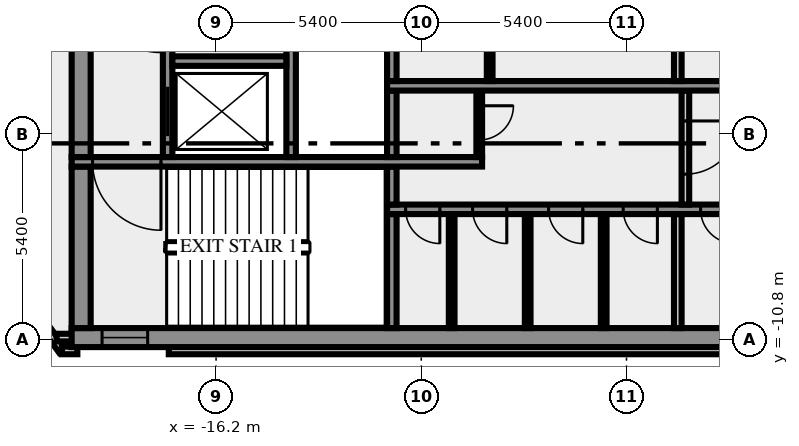
"""IFC4 building model, lengths in metres.
Left out: names, types, materials, properties, quantities, classifications, styles, units other than length and angle.
Written with IfcOpenShell. Run it as: python <this file> out.ifc"""

import sys

from ifc_helpers import new_model, si_unit, direction, frame, frame_2d, origin, place, context, subcontext, project, spatial, rectangle, extrude, element, fill, save


model = new_model("IFC4")
c1 = context("Model", 3, precision=1e-05, world=origin(), true_north=direction((0.0, 1.0)))
c2 = subcontext(c1, "Body", "Model", "MODEL_VIEW")
j1 = project(units=[si_unit("LENGTHUNIT", "METRE"), si_unit("PLANEANGLEUNIT", "RADIAN")], contexts=[c1])
p1 = place(None, origin())
s1 = spatial("IfcSite", under=j1, at=p1, CompositionType="ELEMENT")
p2 = place(p1, origin())
s2 = spatial("IfcBuilding", under=s1, at=p2, CompositionType="ELEMENT")
p3 = place(p2, frame((0.0, 0.0, 198.0)))
s3 = spatial("IfcBuildingStorey", under=s2, at=p3, CompositionType="ELEMENT", Elevation=198.0)
p4 = place(p3, frame((-21.833, -8.909, 0.0), z_axis=(0.0, 0.0, 1.0), x_axis=(0.587766567315, -0.809030569476, 0.0)))
e1 = element("IfcWall", 1, at=p4, inside=s3, PredefinedType="SOLIDWALL", context=c2, shape_type="SweptSolid", body=[
    extrude(rectangle(XDim=2.688, YDim=0.2, at=frame_2d((1.344, 0.0))), origin(), (0.0, 0.0, 1.0), 3.65),
])
p5 = place(p3, frame((-20.256, -11.088, 0.0), z_axis=(0.0, 0.0, 1.0), x_axis=(1.0, 0.0, 0.0)))
e2 = element("IfcWall", 2, at=p5, inside=s3, PredefinedType="SOLIDWALL", context=c2, shape_type="SweptSolid", body=[
    extrude(rectangle(XDim=0.406, YDim=0.2, at=frame_2d((0.203, 0.0))), origin(), (0.0, 0.0, 1.0), 3.65),
])
p6 = place(p3, frame((-17.444, -11.088, 0.0), z_axis=(0.0, 0.0, 1.0), x_axis=(1.0, 0.0, 0.0)))
e3 = element("IfcWall", 3, at=p6, inside=s3, PredefinedType="SOLIDWALL", context=c2, shape_type="SweptSolid", body=[
    extrude(rectangle(XDim=34.888, YDim=0.2, at=frame_2d((17.444, 0.0))), origin(), (0.0, 0.0, 1.0), 3.65),
])
p7 = place(p3, frame((-19.98, -10.75, 0.0), z_axis=(0.0, 0.0, 1.0), x_axis=(-1.0, 0.0, 0.0)))
e4 = element("IfcWall", 4, at=p7, inside=s3, PredefinedType="SOLIDWALL", context=c2, shape_type="SweptSolid", body=[
    extrude(rectangle(XDim=0.417, YDim=0.2, at=frame_2d((0.208, 0.0))), origin(), (0.0, 0.0, 1.0), 3.65),
])
p8 = place(p3, frame((-20.0, -10.75, 0.0), z_axis=(0.0, 0.0, 1.0), x_axis=(1.0, 0.0, 0.0)))
e5 = element("IfcWall", 5, at=p8, inside=s3, PredefinedType="SHEAR", context=c2, shape_type="SweptSolid", body=[
    extrude(rectangle(XDim=40.0, YDim=0.5, at=frame_2d((20.0, 0.0))), origin(), (0.0, 0.0, 1.0), 3.65),
])
p9 = place(p8, frame((0.8, 0.0, 1.0)))
e6 = element("IfcOpeningElement", 6, at=p9, cuts=e5, PredefinedType="OPENING", context=c2, shape_type="SweptSolid", body=[
    extrude(rectangle(XDim=1.2, YDim=1.2, at=frame_2d((0.6, 0.6))), frame((0.0, 0.26, 0.0), z_axis=(0.0, -1.0, 0.0), x_axis=(1.0, 0.0, 0.0)), (0.0, 0.0, 1.0), 0.52),
])
p10 = place(p8, frame((38.0, 0.0, 1.0)))
e7 = element("IfcOpeningElement", 7, at=p10, cuts=e5, PredefinedType="OPENING", context=c2, shape_type="SweptSolid", body=[
    extrude(rectangle(XDim=1.2, YDim=1.2, at=frame_2d((0.6, 0.6))), frame((0.0, 0.26, 0.0), z_axis=(0.0, -1.0, 0.0), x_axis=(1.0, 0.0, 0.0)), (0.0, 0.0, 1.0), 0.52),
])
p11 = place(p3, frame((-19.75, -10.5, 0.0), z_axis=(0.0, 0.0, 1.0), x_axis=(0.0, 1.0, 0.0)))
e8 = element("IfcWall", 8, at=p11, inside=s3, PredefinedType="SHEAR", context=c2, shape_type="SweptSolid", body=[
    extrude(rectangle(XDim=4.25, YDim=0.5, at=frame_2d((2.125, 0.0))), origin(), (0.0, 0.0, 1.0), 3.65),
])
p12 = place(p3, frame((-11.575, -10.5, 0.0), z_axis=(0.0, 0.0, 1.0), x_axis=(0.0, 1.0, 0.0)))
e9 = element("IfcWall", 9, at=p12, inside=s3, PredefinedType="SHEAR", context=c2, shape_type="SweptSolid", body=[
    extrude(rectangle(XDim=3.0, YDim=0.25, at=frame_2d((1.5, 0.0))), origin(), (0.0, 0.0, 1.0), 3.65),
])
for number, where, z_axis, x_axis in (
    (10, (-10.0, -10.5, 0.0), (0.0, 0.0, 1.0), (0.0, 1.0, 0.0)),
    (11, (-8.0, -10.5, 0.0), (0.0, 0.0, 1.0), (0.0, 1.0, 0.0)),
    (12, (-6.0, -10.5, 0.0), (0.0, 0.0, 1.0), (0.0, 1.0, 0.0)),
):
    element("IfcWall", number, at=place(p3, frame(where, z_axis=z_axis, x_axis=x_axis)), inside=s3, PredefinedType="PARTITIONING", context=c2, shape_type="SweptSolid", body=[
        extrude(rectangle(XDim=3.0, YDim=0.15, at=frame_2d((1.5, 0.0))), origin(), (0.0, 0.0, 1.0), 3.65),
    ])
p13 = place(p3, frame((-4.05, -10.5, 0.0), z_axis=(0.0, 0.0, 1.0), x_axis=(0.0, 1.0, 0.0)))
e13 = element("IfcWall", 13, at=p13, inside=s3, PredefinedType="SOLIDWALL", context=c2, shape_type="SweptSolid", body=[
    extrude(rectangle(XDim=3.0, YDim=0.2, at=frame_2d((1.5, 0.0))), origin(), (0.0, 0.0, 1.0), 3.65),
])
p14 = place(p3, frame((11.7, -7.375, 0.0), z_axis=(0.0, 0.0, 1.0), x_axis=(-1.0, 0.0, 0.0)))
e14 = element("IfcWall", 14, at=p14, inside=s3, PredefinedType="SHEAR", context=c2, shape_type="SweptSolid", body=[
    extrude(rectangle(XDim=23.4, YDim=0.25, at=frame_2d((11.7, 0.0))), origin(), (0.0, 0.0, 1.0), 3.65),
])
p15 = place(p14, frame((22.012, 0.0, 0.0)))
e15 = element("IfcOpeningElement", 15, at=p15, cuts=e14, PredefinedType="OPENING", context=c2, shape_type="SweptSolid", body=[
    extrude(rectangle(XDim=0.9, YDim=2.1, at=frame_2d((0.45, 1.05))), frame((0.0, 0.135, 0.0), z_axis=(0.0, -1.0, 0.0), x_axis=(1.0, 0.0, 0.0)), (0.0, 0.0, 1.0), 0.27),
])
p16 = place(p14, frame((20.25, 0.0, 0.0)))
e16 = element("IfcOpeningElement", 16, at=p16, cuts=e14, PredefinedType="OPENING", context=c2, shape_type="SweptSolid", body=[
    extrude(rectangle(XDim=0.9, YDim=2.1, at=frame_2d((0.45, 1.05))), frame((0.0, 0.135, 0.0), z_axis=(0.0, -1.0, 0.0), x_axis=(1.0, 0.0, 0.0)), (0.0, 0.0, 1.0), 0.27),
])
p17 = place(p14, frame((18.25, 0.0, 0.0)))
e17 = element("IfcOpeningElement", 17, at=p17, cuts=e14, PredefinedType="OPENING", context=c2, shape_type="SweptSolid", body=[
    extrude(rectangle(XDim=0.9, YDim=2.1, at=frame_2d((0.45, 1.05))), frame((0.0, 0.135, 0.0), z_axis=(0.0, -1.0, 0.0), x_axis=(1.0, 0.0, 0.0)), (0.0, 0.0, 1.0), 0.27),
])
p18 = place(p14, frame((16.287, 0.0, 0.0)))
e18 = element("IfcOpeningElement", 18, at=p18, cuts=e14, PredefinedType="OPENING", context=c2, shape_type="SweptSolid", body=[
    extrude(rectangle(XDim=0.9, YDim=2.1, at=frame_2d((0.45, 1.05))), frame((0.0, 0.135, 0.0), z_axis=(0.0, -1.0, 0.0), x_axis=(1.0, 0.0, 0.0)), (0.0, 0.0, 1.0), 0.27),
])
p19 = place(p14, frame((14.25, 0.0, 0.0)))
e19 = element("IfcOpeningElement", 19, at=p19, cuts=e14, PredefinedType="OPENING", context=c2, shape_type="SweptSolid", body=[
    extrude(rectangle(XDim=0.9, YDim=2.1, at=frame_2d((0.45, 1.05))), frame((0.0, 0.135, 0.0), z_axis=(0.0, -1.0, 0.0), x_axis=(1.0, 0.0, 0.0)), (0.0, 0.0, 1.0), 0.27),
])
p20 = place(p14, frame((12.125, 0.0, 0.0)))
e20 = element("IfcOpeningElement", 20, at=p20, cuts=e14, PredefinedType="OPENING", context=c2, shape_type="SweptSolid", body=[
    extrude(rectangle(XDim=0.9, YDim=2.1, at=frame_2d((0.45, 1.05))), frame((0.0, 0.135, 0.0), z_axis=(0.0, -1.0, 0.0), x_axis=(1.0, 0.0, 0.0)), (0.0, 0.0, 1.0), 0.27),
])
p21 = place(p14, frame((10.45, 0.0, 0.0)))
e21 = element("IfcOpeningElement", 21, at=p21, cuts=e14, PredefinedType="OPENING", context=c2, shape_type="SweptSolid", body=[
    extrude(rectangle(XDim=0.75, YDim=2.1, at=frame_2d((0.375, 1.05))), frame((0.0, 0.135, 0.0), z_axis=(0.0, -1.0, 0.0), x_axis=(1.0, 0.0, 0.0)), (0.0, 0.0, 1.0), 0.27),
])
p22 = place(p14, frame((8.35, 0.0, 0.0)))
e22 = element("IfcOpeningElement", 22, at=p22, cuts=e14, PredefinedType="OPENING", context=c2, shape_type="SweptSolid", body=[
    extrude(rectangle(XDim=1.1, YDim=2.1, at=frame_2d((0.55, 1.05))), frame((0.0, 0.135, 0.0), z_axis=(0.0, -1.0, 0.0), x_axis=(1.0, 0.0, 0.0)), (0.0, 0.0, 1.0), 0.27),
])
p23 = place(p14, frame((5.85, 0.0, 0.0)))
e23 = element("IfcOpeningElement", 23, at=p23, cuts=e14, PredefinedType="OPENING", context=c2, shape_type="SweptSolid", body=[
    extrude(rectangle(XDim=1.1, YDim=2.1, at=frame_2d((0.55, 1.05))), frame((0.0, 0.135, 0.0), z_axis=(0.0, -1.0, 0.0), x_axis=(1.0, 0.0, 0.0)), (0.0, 0.0, 1.0), 0.27),
])
p24 = place(p14, frame((3.35, 0.0, 0.0)))
e24 = element("IfcOpeningElement", 24, at=p24, cuts=e14, PredefinedType="OPENING", context=c2, shape_type="SweptSolid", body=[
    extrude(rectangle(XDim=1.1, YDim=2.1, at=frame_2d((0.55, 1.05))), frame((0.0, 0.135, 0.0), z_axis=(0.0, -1.0, 0.0), x_axis=(1.0, 0.0, 0.0)), (0.0, 0.0, 1.0), 0.27),
])
p25 = place(p14, frame((0.85, 0.0, 0.0)))
e25 = element("IfcOpeningElement", 25, at=p25, cuts=e14, PredefinedType="OPENING", context=c2, shape_type="SweptSolid", body=[
    extrude(rectangle(XDim=1.1, YDim=2.1, at=frame_2d((0.55, 1.05))), frame((0.0, 0.135, 0.0), z_axis=(0.0, -1.0, 0.0), x_axis=(1.0, 0.0, 0.0)), (0.0, 0.0, 1.0), 0.27),
])
p26 = place(p3, frame((-11.575, -7.25, 0.0), z_axis=(0.0, 0.0, 1.0), x_axis=(0.0, 1.0, 0.0)))
e26 = element("IfcWall", 26, at=p26, inside=s3, PredefinedType="SHEAR", context=c2, shape_type="SweptSolid", body=[
    extrude(rectangle(XDim=1.0, YDim=0.25, at=frame_2d((0.5, 0.0))), origin(), (0.0, 0.0, 1.0), 3.65),
])
p27 = place(p3, frame((-3.85, -4.25, 0.0), z_axis=(0.0, 0.0, 1.0), x_axis=(0.0, -1.0, 0.0)))
e27 = element("IfcWall", 27, at=p27, inside=s3, PredefinedType="SOLIDWALL", context=c2, shape_type="SweptSolid", body=[
    extrude(rectangle(XDim=3.0, YDim=0.2, at=frame_2d((1.5, 0.0))), origin(), (0.0, 0.0, 1.0), 3.65),
])
p28 = place(p27, frame((0.8, 0.0, 0.0)))
e28 = element("IfcOpeningElement", 28, at=p28, cuts=e27, PredefinedType="OPENING", context=c2, shape_type="SweptSolid", body=[
    extrude(rectangle(XDim=1.4, YDim=2.1, at=frame_2d((0.7, 1.05))), frame((0.0, 0.11, 0.0), z_axis=(0.0, -1.0, 0.0), x_axis=(1.0, 0.0, 0.0)), (0.0, 0.0, 1.0), 0.22),
])
p29 = place(p3, frame((-9.2, -6.125, 0.0), z_axis=(0.0, 0.0, 1.0), x_axis=(-1.0, 0.0, 0.0)))
e29 = element("IfcWall", 29, at=p29, inside=s3, PredefinedType="SHEAR", context=c2, shape_type="SweptSolid", body=[
    extrude(rectangle(XDim=10.8, YDim=0.25, at=frame_2d((5.4, 0.0))), origin(), (0.0, 0.0, 1.0), 3.65),
])
p30 = place(p29, frame((8.45, 0.0, 0.0)))
e30 = element("IfcOpeningElement", 30, at=p30, cuts=e29, PredefinedType="OPENING", context=c2, shape_type="SweptSolid", body=[
    extrude(rectangle(XDim=1.8, YDim=2.1, at=frame_2d((0.9, 1.05))), frame((0.0, 0.135, 0.0), z_axis=(0.0, -1.0, 0.0), x_axis=(1.0, 0.0, 0.0)), (0.0, 0.0, 1.0), 0.27),
])
p31 = place(p3, frame((-19.75, -6.0, 0.0), z_axis=(0.0, 0.0, 1.0), x_axis=(0.0, 1.0, 0.0)))
e31 = element("IfcWall", 31, at=p31, inside=s3, PredefinedType="SHEAR", context=c2, shape_type="SweptSolid", body=[
    extrude(rectangle(XDim=4.3, YDim=0.5, at=frame_2d((2.15, 0.0))), origin(), (0.0, 0.0, 1.0), 3.65),
])
p32 = place(p3, frame((-17.475, -6.0, 0.0), z_axis=(0.0, 0.0, 1.0), x_axis=(0.0, 1.0, 0.0)))
e32 = element("IfcWall", 32, at=p32, inside=s3, PredefinedType="SHEAR", context=c2, shape_type="SweptSolid", body=[
    extrude(rectangle(XDim=4.3, YDim=0.25, at=frame_2d((2.15, 0.0))), origin(), (0.0, 0.0, 1.0), 3.65),
])
p33 = place(p32, frame((0.55, 0.0, 0.0)))
e33 = element("IfcOpeningElement", 33, at=p33, cuts=e32, PredefinedType="OPENING", context=c2, shape_type="SweptSolid", body=[
    extrude(rectangle(XDim=1.3, YDim=2.1, at=frame_2d((0.65, 1.05))), frame((0.0, 0.135, 0.0), z_axis=(0.0, -1.0, 0.0), x_axis=(1.0, 0.0, 0.0)), (0.0, 0.0, 1.0), 0.27),
])
p34 = place(p3, frame((-14.225, -6.0, 0.0), z_axis=(0.0, 0.0, 1.0), x_axis=(0.0, 1.0, 0.0)))
e34 = element("IfcWall", 34, at=p34, inside=s3, PredefinedType="SHEAR", context=c2, shape_type="SweptSolid", body=[
    extrude(rectangle(XDim=4.3, YDim=0.25, at=frame_2d((2.15, 0.0))), origin(), (0.0, 0.0, 1.0), 3.65),
])
p35 = place(p3, frame((-11.575, -6.0, 0.0), z_axis=(0.0, 0.0, 1.0), x_axis=(0.0, 1.0, 0.0)))
e35 = element("IfcWall", 35, at=p35, inside=s3, PredefinedType="SHEAR", context=c2, shape_type="SweptSolid", body=[
    extrude(rectangle(XDim=1.75, YDim=0.25, at=frame_2d((0.875, 0.0))), origin(), (0.0, 0.0, 1.0), 3.65),
])
p36 = place(p3, frame((-9.275, -4.25, 0.0), z_axis=(0.0, 0.0, 1.0), x_axis=(0.0, -1.0, 0.0)))
e36 = element("IfcWall", 36, at=p36, inside=s3, PredefinedType="PARTITIONING", context=c2, shape_type="SweptSolid", body=[
    extrude(rectangle(XDim=1.75, YDim=0.15, at=frame_2d((0.875, 0.0))), origin(), (0.0, 0.0, 1.0), 3.65),
])
p37 = place(p36, frame((0.4, 0.0, 0.0)))
e37 = element("IfcOpeningElement", 37, at=p37, cuts=e36, PredefinedType="OPENING", context=c2, shape_type="SweptSolid", body=[
    extrude(rectangle(XDim=0.9, YDim=2.1, at=frame_2d((0.45, 1.05))), frame((0.0, 0.085, 0.0), z_axis=(0.0, -1.0, 0.0), x_axis=(1.0, 0.0, 0.0)), (0.0, 0.0, 1.0), 0.17),
])
p38 = place(p3, frame((-11.7, -4.125, 0.0), z_axis=(0.0, 0.0, 1.0), x_axis=(1.0, 0.0, 0.0)))
e38 = element("IfcWall", 38, at=p38, inside=s3, PredefinedType="SHEAR", context=c2, shape_type="SweptSolid", body=[
    extrude(rectangle(XDim=10.05, YDim=0.25, at=frame_2d((5.025, 0.0))), origin(), (0.0, 0.0, 1.0), 3.65),
])
p39 = place(p3, frame((-11.575, -4.0, 0.0), z_axis=(0.0, 0.0, 1.0), x_axis=(0.0, 1.0, 0.0)))
e39 = element("IfcWall", 39, at=p39, inside=s3, PredefinedType="SHEAR", context=c2, shape_type="SweptSolid", body=[
    extrude(rectangle(XDim=2.3, YDim=0.25, at=frame_2d((1.15, 0.0))), origin(), (0.0, 0.0, 1.0), 3.65),
])
p40 = place(p3, frame((-9.0, -4.0, 0.0), z_axis=(0.0, 0.0, 1.0), x_axis=(0.0, 1.0, 0.0)))
e40 = element("IfcWall", 40, at=p40, inside=s3, PredefinedType="PARTITIONING", context=c2, shape_type="SweptSolid", body=[
    extrude(rectangle(XDim=2.3, YDim=0.15, at=frame_2d((1.15, 0.0))), origin(), (0.0, 0.0, 1.0), 3.65),
])
p41 = place(p3, frame((-4.05, -4.0, 0.0), z_axis=(0.0, 0.0, 1.0), x_axis=(0.0, 1.0, 0.0)))
e41 = element("IfcWall", 41, at=p41, inside=s3, PredefinedType="SOLIDWALL", context=c2, shape_type="SweptSolid", body=[
    extrude(rectangle(XDim=2.3, YDim=0.2, at=frame_2d((1.15, 0.0))), origin(), (0.0, 0.0, 1.0), 3.65),
])
p42 = place(p3, frame((-17.35, -3.475, 0.0), z_axis=(0.0, 0.0, 1.0), x_axis=(1.0, 0.0, 0.0)))
e42 = element("IfcWall", 42, at=p42, inside=s3, PredefinedType="SHEAR", context=c2, shape_type="SweptSolid", body=[
    extrude(rectangle(XDim=3.0, YDim=0.25, at=frame_2d((1.5, 0.0))), origin(), (0.0, 0.0, 1.0), 3.65),
])
p43 = place(p9, origin())
e43 = element("IfcWindow", 43, at=p43, inside=s3, PartitioningType="SINGLE_PANEL", PredefinedType="WINDOW", context=c2, shape_type="SweptSolid", body=[
    extrude(rectangle(XDim=1.2, YDim=1.2, at=frame_2d((0.6, 0.6))), frame((0.0, 0.03, 0.0), z_axis=(0.0, -1.0, 0.0), x_axis=(1.0, 0.0, 0.0)), (0.0, 0.0, 1.0), 0.06),
])
fill(e6, e43)
p44 = place(p15, origin())
e44 = element("IfcDoor", 44, at=p44, inside=s3, OperationType="SINGLE_SWING_RIGHT", PredefinedType="DOOR", context=c2, shape_type="SweptSolid", body=[
    extrude(rectangle(XDim=0.9, YDim=2.1, at=frame_2d((0.45, 1.05))), frame((0.0, 0.025, 0.0), z_axis=(0.0, -1.0, 0.0), x_axis=(1.0, 0.0, 0.0)), (0.0, 0.0, 1.0), 0.05),
])
fill(e15, e44)
p45 = place(p16, origin())
e45 = element("IfcDoor", 45, at=p45, inside=s3, OperationType="SINGLE_SWING_RIGHT", PredefinedType="DOOR", context=c2, shape_type="SweptSolid", body=[
    extrude(rectangle(XDim=0.9, YDim=2.1, at=frame_2d((0.45, 1.05))), frame((0.0, 0.025, 0.0), z_axis=(0.0, -1.0, 0.0), x_axis=(1.0, 0.0, 0.0)), (0.0, 0.0, 1.0), 0.05),
])
fill(e16, e45)
p46 = place(p17, origin())
e46 = element("IfcDoor", 46, at=p46, inside=s3, OperationType="SINGLE_SWING_RIGHT", PredefinedType="DOOR", context=c2, shape_type="SweptSolid", body=[
    extrude(rectangle(XDim=0.9, YDim=2.1, at=frame_2d((0.45, 1.05))), frame((0.0, 0.025, 0.0), z_axis=(0.0, -1.0, 0.0), x_axis=(1.0, 0.0, 0.0)), (0.0, 0.0, 1.0), 0.05),
])
fill(e17, e46)
p47 = place(p18, origin())
e47 = element("IfcDoor", 47, at=p47, inside=s3, OperationType="SINGLE_SWING_RIGHT", PredefinedType="DOOR", context=c2, shape_type="SweptSolid", body=[
    extrude(rectangle(XDim=0.9, YDim=2.1, at=frame_2d((0.45, 1.05))), frame((0.0, 0.025, 0.0), z_axis=(0.0, -1.0, 0.0), x_axis=(1.0, 0.0, 0.0)), (0.0, 0.0, 1.0), 0.05),
])
fill(e18, e47)
p48 = place(p19, origin())
e48 = element("IfcDoor", 48, at=p48, inside=s3, OperationType="SINGLE_SWING_RIGHT", PredefinedType="DOOR", context=c2, shape_type="SweptSolid", body=[
    extrude(rectangle(XDim=0.9, YDim=2.1, at=frame_2d((0.45, 1.05))), frame((0.0, 0.025, 0.0), z_axis=(0.0, -1.0, 0.0), x_axis=(1.0, 0.0, 0.0)), (0.0, 0.0, 1.0), 0.05),
])
fill(e19, e48)
p49 = place(p28, origin())
e49 = element("IfcDoor", 49, at=p49, inside=s3, OperationType="DOUBLE_DOOR_SINGLE_SWING", PredefinedType="DOOR", context=c2, shape_type="SweptSolid", body=[
    extrude(rectangle(XDim=1.4, YDim=2.1, at=frame_2d((0.7, 1.05))), frame((0.0, 0.025, 0.0), z_axis=(0.0, -1.0, 0.0), x_axis=(1.0, 0.0, 0.0)), (0.0, 0.0, 1.0), 0.05),
])
fill(e28, e49)
p50 = place(p30, origin())
e50 = element("IfcDoor", 50, at=p50, inside=s3, OperationType="DOUBLE_DOOR_SINGLE_SWING", PredefinedType="DOOR", context=c2, shape_type="SweptSolid", body=[
    extrude(rectangle(XDim=1.8, YDim=2.1, at=frame_2d((0.9, 1.05))), frame((0.0, 0.025, 0.0), z_axis=(0.0, -1.0, 0.0), x_axis=(1.0, 0.0, 0.0)), (0.0, 0.0, 1.0), 0.05),
])
fill(e30, e50)
p51 = place(p33, origin())
e51 = element("IfcDoor", 51, at=p51, inside=s3, OperationType="DOUBLE_DOOR_SLIDING", PredefinedType="DOOR", context=c2, shape_type="SweptSolid", body=[
    extrude(rectangle(XDim=1.3, YDim=2.1, at=frame_2d((0.65, 1.05))), frame((0.0, 0.025, 0.0), z_axis=(0.0, -1.0, 0.0), x_axis=(1.0, 0.0, 0.0)), (0.0, 0.0, 1.0), 0.05),
])
fill(e33, e51)
p52 = place(p37, origin())
e52 = element("IfcDoor", 52, at=p52, inside=s3, OperationType="SINGLE_SWING_LEFT", PredefinedType="DOOR", context=c2, shape_type="SweptSolid", body=[
    extrude(rectangle(XDim=0.9, YDim=2.1, at=frame_2d((0.45, 1.05))), frame((0.0, 0.025, 0.0), z_axis=(0.0, -1.0, 0.0), x_axis=(1.0, 0.0, 0.0)), (0.0, 0.0, 1.0), 0.05),
])
fill(e37, e52)
save(model, sys.argv[1])
